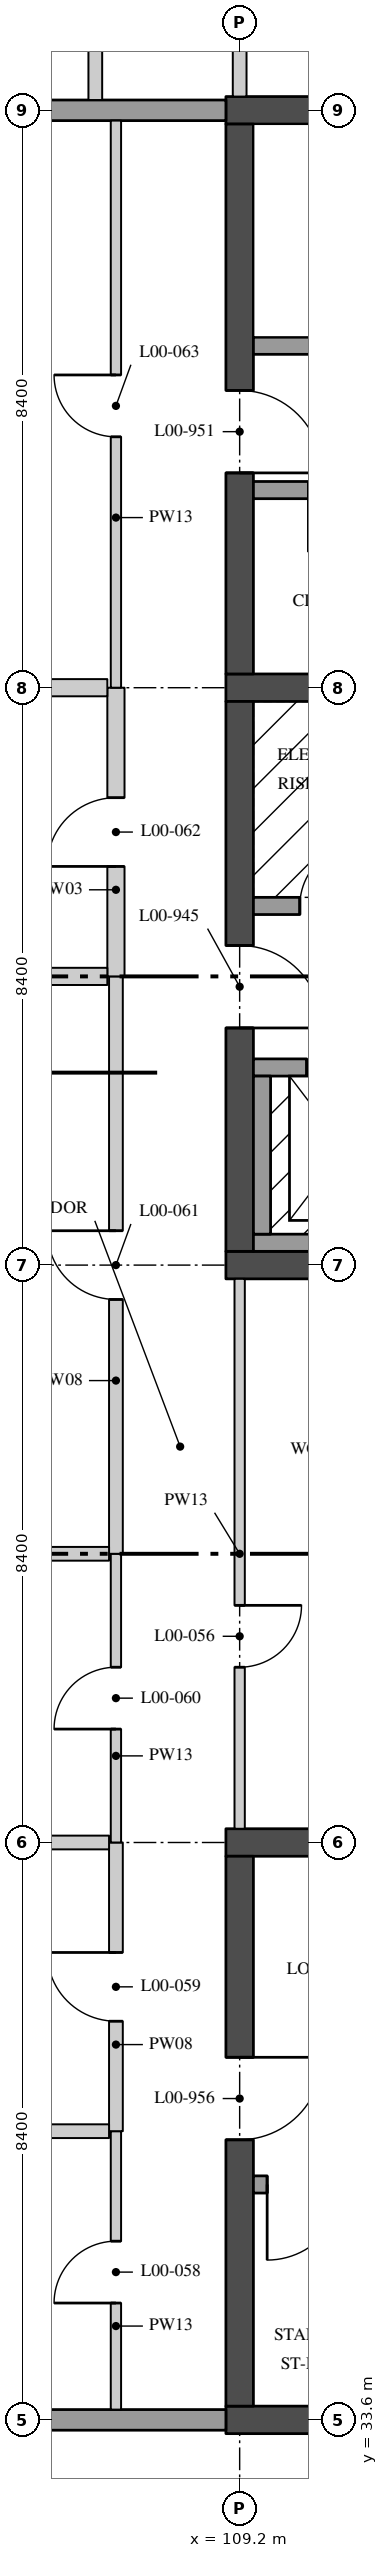
"""IFC4 building model, lengths in metres.
Left out: names, types, materials, properties, quantities, classifications, styles, units other than length and angle.
Written with IfcOpenShell. Run it as: python <this file> out.ifc"""

import sys

from ifc_helpers import new_model, si_unit, direction, frame, frame_2d, origin, place, context, subcontext, project, spatial, rectangle, extrude, element, fill, save


model = new_model("IFC4")
c1 = context("Model", 3, precision=1e-05, world=origin(), true_north=direction((0.0, 1.0)))
c2 = subcontext(c1, "Body", "Model", "MODEL_VIEW")
j1 = project(units=[si_unit("LENGTHUNIT", "METRE"), si_unit("PLANEANGLEUNIT", "RADIAN")], contexts=[c1])
p1 = place(None, origin())
s1 = spatial("IfcSite", under=j1, at=p1, CompositionType="ELEMENT")
p2 = place(p1, origin())
s2 = spatial("IfcBuilding", under=s1, at=p2, CompositionType="ELEMENT")
p3 = place(p2, origin())
s3 = spatial("IfcBuildingStorey", under=s2, at=p3, CompositionType="ELEMENT", Elevation=0.0)
p4 = place(p3, frame((109.0, 50.4, 0.0), z_axis=(0.0, 0.0, 1.0), x_axis=(1.0, 0.0, 0.0)))
e1 = element("IfcWall", 1, at=p4, inside=s3, PredefinedType="SHEAR", context=c2, shape_type="SweptSolid", body=[
    extrude(rectangle(XDim=8.8, YDim=0.4, at=frame_2d((4.4, 0.0))), origin(), (0.0, 0.0, 1.0), 5.05),
])
p5 = place(p3, frame((109.0, 58.8, 0.0), z_axis=(0.0, 0.0, 1.0), x_axis=(1.0, 0.0, 0.0)))
e2 = element("IfcWall", 2, at=p5, inside=s3, PredefinedType="SHEAR", context=c2, shape_type="SweptSolid", body=[
    extrude(rectangle(XDim=8.8, YDim=0.4, at=frame_2d((4.4, 0.0))), origin(), (0.0, 0.0, 1.0), 5.05),
])
p6 = place(p5, frame((6.65, 0.0, 0.0)))
e3 = element("IfcOpeningElement", 3, at=p6, cuts=e2, PredefinedType="OPENING", context=c2, shape_type="SweptSolid", body=[
    extrude(rectangle(XDim=1.1, YDim=2.1, at=frame_2d((0.55, 1.05))), frame((0.0, 0.21, 0.0), z_axis=(0.0, -1.0, 0.0), x_axis=(1.0, 0.0, 0.0)), (0.0, 0.0, 1.0), 0.42),
])
p7 = place(p3, frame((109.2, 50.6, 0.0), z_axis=(0.0, 0.0, 1.0), x_axis=(0.0, 1.0, 0.0)))
e4 = element("IfcWall", 4, at=p7, inside=s3, PredefinedType="SHEAR", context=c2, shape_type="SweptSolid", body=[
    extrude(rectangle(XDim=8.0, YDim=0.4, at=frame_2d((4.0, 0.0))), origin(), (0.0, 0.0, 1.0), 5.05),
])
p8 = place(p7, frame((3.25, 0.0, 0.0)))
e5 = element("IfcOpeningElement", 5, at=p8, cuts=e4, PredefinedType="OPENING", context=c2, shape_type="SweptSolid", body=[
    extrude(rectangle(XDim=1.2, YDim=2.1, at=frame_2d((0.6, 1.05))), frame((0.0, 0.21, 0.0), z_axis=(0.0, -1.0, 0.0), x_axis=(1.0, 0.0, 0.0)), (0.0, 0.0, 1.0), 0.42),
])
p9 = place(p3, frame((109.4, 55.625, 0.0), z_axis=(0.0, 0.0, 1.0), x_axis=(1.0, 0.0, 0.0)))
e6 = element("IfcWall", 6, at=p9, inside=s3, PredefinedType="SOLIDWALL", context=c2, shape_type="SweptSolid", body=[
    extrude(rectangle(XDim=2.25, YDim=0.25, at=frame_2d((1.125, 0.0))), origin(), (0.0, 0.0, 1.0), 5.05),
])
p10 = place(p9, frame((0.675, 0.0, 0.0)))
e7 = element("IfcOpeningElement", 7, at=p10, cuts=e6, PredefinedType="OPENING", context=c2, shape_type="SweptSolid", body=[
    extrude(rectangle(XDim=0.9, YDim=2.1, at=frame_2d((0.45, 1.05))), frame((0.0, 0.135, 0.0), z_axis=(0.0, -1.0, 0.0), x_axis=(1.0, 0.0, 0.0)), (0.0, 0.0, 1.0), 0.27),
])
p11 = place(p3, frame((109.0, 67.2, 0.0), z_axis=(0.0, 0.0, 1.0), x_axis=(1.0, 0.0, 0.0)))
e8 = element("IfcWall", 8, at=p11, inside=s3, PredefinedType="SHEAR", context=c2, shape_type="SweptSolid", body=[
    extrude(rectangle(XDim=8.8, YDim=0.4, at=frame_2d((4.4, 0.0))), origin(), (0.0, 0.0, 1.0), 5.05),
])
p12 = place(p3, frame((109.2, 59.0, 0.0), z_axis=(0.0, 0.0, 1.0), x_axis=(0.0, 1.0, 0.0)))
e9 = element("IfcWall", 9, at=p12, inside=s3, PredefinedType="SHEAR", context=c2, shape_type="SweptSolid", body=[
    extrude(rectangle(XDim=8.0, YDim=0.4, at=frame_2d((4.0, 0.0))), origin(), (0.0, 0.0, 1.0), 5.05),
])
p13 = place(p12, frame((2.925, 0.0, 0.0)))
e10 = element("IfcOpeningElement", 10, at=p13, cuts=e9, PredefinedType="OPENING", context=c2, shape_type="SweptSolid", body=[
    extrude(rectangle(XDim=1.2, YDim=2.1, at=frame_2d((0.6, 1.05))), frame((0.0, 0.21, 0.0), z_axis=(0.0, -1.0, 0.0), x_axis=(1.0, 0.0, 0.0)), (0.0, 0.0, 1.0), 0.42),
])
p14 = place(p3, frame((117.4, 63.775, 0.0), z_axis=(0.0, 0.0, 1.0), x_axis=(-1.0, 0.0, 0.0)))
e11 = element("IfcWall", 11, at=p14, inside=s3, PredefinedType="SOLIDWALL", context=c2, shape_type="SweptSolid", body=[
    extrude(rectangle(XDim=8.0, YDim=0.25, at=frame_2d((4.0, 0.0))), origin(), (0.0, 0.0, 1.0), 5.05),
])
p15 = place(p14, frame((0.2, 0.0, 0.0)))
e12 = element("IfcOpeningElement", 12, at=p15, cuts=e11, PredefinedType="OPENING", context=c2, shape_type="SweptSolid", body=[
    extrude(rectangle(XDim=1.1, YDim=2.1, at=frame_2d((0.55, 1.05))), frame((0.0, 0.135, 0.0), z_axis=(0.0, -1.0, 0.0), x_axis=(1.0, 0.0, 0.0)), (0.0, 0.0, 1.0), 0.27),
])
p16 = place(p3, frame((114.75, 61.675, 0.0), z_axis=(0.0, 0.0, 1.0), x_axis=(-1.0, 0.0, 0.0)))
e13 = element("IfcWall", 13, at=p16, inside=s3, PredefinedType="SOLIDWALL", context=c2, shape_type="SweptSolid", body=[
    extrude(rectangle(XDim=5.35, YDim=0.25, at=frame_2d((2.675, 0.0))), origin(), (0.0, 0.0, 1.0), 5.05),
])
p17 = place(p16, frame((3.65, 0.0, 0.0)))
e14 = element("IfcOpeningElement", 14, at=p17, cuts=e13, PredefinedType="OPENING", context=c2, shape_type="SweptSolid", body=[
    extrude(rectangle(XDim=0.9, YDim=2.1, at=frame_2d((0.45, 1.05))), frame((0.0, 0.135, 0.0), z_axis=(0.0, -1.0, 0.0), x_axis=(1.0, 0.0, 0.0)), (0.0, 0.0, 1.0), 0.27),
])
p18 = place(p16, frame((0.9, 0.0, 0.0)))
e15 = element("IfcOpeningElement", 15, at=p18, cuts=e13, PredefinedType="OPENING", context=c2, shape_type="SweptSolid", body=[
    extrude(rectangle(XDim=0.8, YDim=2.1, at=frame_2d((0.4, 1.05))), frame((0.0, 0.135, 0.0), z_axis=(0.0, -1.0, 0.0), x_axis=(1.0, 0.0, 0.0)), (0.0, 0.0, 1.0), 0.27),
])
for number, where, z_axis, x_axis in (
    (16, (109.0, 33.6, 0.0), (0.0, 0.0, 1.0), (1.0, 0.0, 0.0)),
    (17, (109.0, 42.0, 0.0), (0.0, 0.0, 1.0), (1.0, 0.0, 0.0)),
):
    element("IfcWall", number, at=place(p3, frame(where, z_axis=z_axis, x_axis=x_axis)), inside=s3, PredefinedType="SHEAR", context=c2, shape_type="SweptSolid", body=[
        extrude(rectangle(XDim=8.8, YDim=0.4, at=frame_2d((4.4, 0.0))), origin(), (0.0, 0.0, 1.0), 5.05),
    ])
p19 = place(p3, frame((109.2, 33.8, 0.0), z_axis=(0.0, 0.0, 1.0), x_axis=(0.0, 1.0, 0.0)))
e18 = element("IfcWall", 18, at=p19, inside=s3, PredefinedType="SHEAR", context=c2, shape_type="SweptSolid", body=[
    extrude(rectangle(XDim=8.0, YDim=0.4, at=frame_2d((4.0, 0.0))), origin(), (0.0, 0.0, 1.0), 5.05),
])
p20 = place(p19, frame((3.875, 0.0, 0.0)))
e19 = element("IfcOpeningElement", 19, at=p20, cuts=e18, PredefinedType="OPENING", context=c2, shape_type="SweptSolid", body=[
    extrude(rectangle(XDim=1.2, YDim=2.1, at=frame_2d((0.6, 1.05))), frame((0.0, 0.21, 0.0), z_axis=(0.0, -1.0, 0.0), x_axis=(1.0, 0.0, 0.0)), (0.0, 0.0, 1.0), 0.42),
])
p21 = place(p3, frame((109.4, 37.025, 0.0), z_axis=(0.0, 0.0, 1.0), x_axis=(1.0, 0.0, 0.0)))
e20 = element("IfcWall", 20, at=p21, inside=s3, PredefinedType="SOLIDWALL", context=c2, shape_type="SweptSolid", body=[
    extrude(rectangle(XDim=8.0, YDim=0.25, at=frame_2d((4.0, 0.0))), origin(), (0.0, 0.0, 1.0), 5.05),
])
p22 = place(p21, frame((0.2, 0.0, 0.0)))
e21 = element("IfcOpeningElement", 21, at=p22, cuts=e20, PredefinedType="OPENING", context=c2, shape_type="SweptSolid", body=[
    extrude(rectangle(XDim=1.1, YDim=2.1, at=frame_2d((0.55, 1.05))), frame((0.0, 0.135, 0.0), z_axis=(0.0, -1.0, 0.0), x_axis=(1.0, 0.0, 0.0)), (0.0, 0.0, 1.0), 0.27),
])
p23 = place(p3, frame((109.4, 53.275, 0.0), z_axis=(0.0, 0.0, 1.0), x_axis=(1.0, 0.0, 0.0)))
e22 = element("IfcWall", 22, at=p23, inside=s3, PredefinedType="SOLIDWALL", context=c2, shape_type="SweptSolid", body=[
    extrude(rectangle(XDim=2.65, YDim=0.25, at=frame_2d((1.325, 0.0))), origin(), (0.0, 0.0, 1.0), 5.05),
])
p24 = place(p23, frame((0.775, 0.0, 0.0)))
e23 = element("IfcOpeningElement", 23, at=p24, cuts=e22, PredefinedType="OPENING", context=c2, shape_type="SweptSolid", body=[
    extrude(rectangle(XDim=1.1, YDim=2.1, at=frame_2d((0.55, 1.05))), frame((0.0, 0.135, 0.0), z_axis=(0.0, -1.0, 0.0), x_axis=(1.0, 0.0, 0.0)), (0.0, 0.0, 1.0), 0.27),
])
p25 = place(p3, frame((109.4, 50.725, 0.0), z_axis=(0.0, 0.0, 1.0), x_axis=(1.0, 0.0, 0.0)))
e24 = element("IfcWall", 24, at=p25, inside=s3, PredefinedType="SOLIDWALL", context=c2, shape_type="SweptSolid", body=[
    extrude(rectangle(XDim=2.65, YDim=0.25, at=frame_2d((1.325, 0.0))), origin(), (0.0, 0.0, 1.0), 5.05),
])
p26 = place(p3, frame((109.525, 50.85, 0.0), z_axis=(0.0, 0.0, 1.0), x_axis=(0.0, 1.0, 0.0)))
e25 = element("IfcWall", 25, at=p26, inside=s3, PredefinedType="SOLIDWALL", context=c2, shape_type="SweptSolid", body=[
    extrude(rectangle(XDim=2.3, YDim=0.25, at=frame_2d((1.15, 0.0))), origin(), (0.0, 0.0, 1.0), 5.05),
])
p27 = place(p3, frame((109.2, 42.2, 0.0), z_axis=(0.0, 0.0, 1.0), x_axis=(0.0, 1.0, 0.0)))
e26 = element("IfcWall", 26, at=p27, inside=s3, PredefinedType="PARTITIONING", context=c2, shape_type="SweptSolid", body=[
    extrude(rectangle(XDim=8.0, YDim=0.15, at=frame_2d((4.0, 0.0))), origin(), (0.0, 0.0, 1.0), 5.05),
])
p28 = place(p27, frame((2.35, 0.0, 0.0)))
e27 = element("IfcOpeningElement", 27, at=p28, cuts=e26, PredefinedType="OPENING", context=c2, shape_type="SweptSolid", body=[
    extrude(rectangle(XDim=0.9, YDim=2.1, at=frame_2d((0.45, 1.05))), frame((0.0, 0.085, 0.0), z_axis=(0.0, -1.0, 0.0), x_axis=(1.0, 0.0, 0.0)), (0.0, 0.0, 1.0), 0.17),
])
p29 = place(p3, frame((107.4, 33.75, 0.0), z_axis=(0.0, 0.0, 1.0), x_axis=(0.0, 1.0, 0.0)))
e28 = element("IfcWall", 28, at=p29, inside=s3, PredefinedType="PARTITIONING", context=c2, shape_type="SweptSolid", body=[
    extrude(rectangle(XDim=4.05, YDim=0.15, at=frame_2d((2.025, 0.0))), origin(), (0.0, 0.0, 1.0), 5.05),
])
p30 = place(p29, frame((1.55, 0.0, 0.0)))
e29 = element("IfcOpeningElement", 29, at=p30, cuts=e28, PredefinedType="OPENING", context=c2, shape_type="SweptSolid", body=[
    extrude(rectangle(XDim=0.9, YDim=2.1, at=frame_2d((0.45, 1.05))), frame((0.0, 0.085, 0.0), z_axis=(0.0, -1.0, 0.0), x_axis=(1.0, 0.0, 0.0)), (0.0, 0.0, 1.0), 0.17),
])
p31 = place(p3, frame((107.4, 37.8, 0.0), z_axis=(0.0, 0.0, 1.0), x_axis=(0.0, 1.0, 0.0)))
e30 = element("IfcWall", 30, at=p31, inside=s3, PredefinedType="PARTITIONING", context=c2, shape_type="SweptSolid", body=[
    extrude(rectangle(XDim=4.2, YDim=0.2, at=frame_2d((2.1, 0.0))), origin(), (0.0, 0.0, 1.0), 5.05),
])
p32 = place(p31, frame((1.6, 0.0, 0.0)))
e31 = element("IfcOpeningElement", 31, at=p32, cuts=e30, PredefinedType="OPENING", context=c2, shape_type="SweptSolid", body=[
    extrude(rectangle(XDim=1.0, YDim=2.4, at=frame_2d((0.5, 1.2))), frame((0.0, 0.11, 0.0), z_axis=(0.0, -1.0, 0.0), x_axis=(1.0, 0.0, 0.0)), (0.0, 0.0, 1.0), 0.22),
])
p33 = place(p3, frame((107.4, 42.0, 0.0), z_axis=(0.0, 0.0, 1.0), x_axis=(0.0, 1.0, 0.0)))
e32 = element("IfcWall", 32, at=p33, inside=s3, PredefinedType="PARTITIONING", context=c2, shape_type="SweptSolid", body=[
    extrude(rectangle(XDim=4.2, YDim=0.15, at=frame_2d((2.1, 0.0))), origin(), (0.0, 0.0, 1.0), 5.05),
])
p34 = place(p33, frame((1.65, 0.0, 0.0)))
e33 = element("IfcOpeningElement", 33, at=p34, cuts=e32, PredefinedType="OPENING", context=c2, shape_type="SweptSolid", body=[
    extrude(rectangle(XDim=0.9, YDim=2.1, at=frame_2d((0.45, 1.05))), frame((0.0, 0.085, 0.0), z_axis=(0.0, -1.0, 0.0), x_axis=(1.0, 0.0, 0.0)), (0.0, 0.0, 1.0), 0.17),
])
p35 = place(p3, frame((107.4, 46.2, 0.0), z_axis=(0.0, 0.0, 1.0), x_axis=(0.0, 1.0, 0.0)))
e34 = element("IfcWall", 34, at=p35, inside=s3, PredefinedType="PARTITIONING", context=c2, shape_type="SweptSolid", body=[
    extrude(rectangle(XDim=8.4, YDim=0.2, at=frame_2d((4.2, 0.0))), origin(), (0.0, 0.0, 1.0), 5.05),
])
p36 = place(p35, frame((3.7, 0.0, 0.0)))
e35 = element("IfcOpeningElement", 35, at=p36, cuts=e34, PredefinedType="OPENING", context=c2, shape_type="SweptSolid", body=[
    extrude(rectangle(XDim=1.0, YDim=2.4, at=frame_2d((0.5, 1.2))), frame((0.0, 0.11, 0.0), z_axis=(0.0, -1.0, 0.0), x_axis=(1.0, 0.0, 0.0)), (0.0, 0.0, 1.0), 0.22),
])
p37 = place(p3, frame((107.4, 54.6, 0.0), z_axis=(0.0, 0.0, 1.0), x_axis=(0.0, 1.0, 0.0)))
e36 = element("IfcWall", 36, at=p37, inside=s3, PredefinedType="PARTITIONING", context=c2, shape_type="SweptSolid", body=[
    extrude(rectangle(XDim=4.2, YDim=0.25, at=frame_2d((2.1, 0.0))), origin(), (0.0, 0.0, 1.0), 5.05),
])
p38 = place(p37, frame((1.6, 0.0, 0.0)))
e37 = element("IfcOpeningElement", 37, at=p38, cuts=e36, PredefinedType="OPENING", context=c2, shape_type="SweptSolid", body=[
    extrude(rectangle(XDim=1.0, YDim=2.1, at=frame_2d((0.5, 1.05))), frame((0.0, 0.135, 0.0), z_axis=(0.0, -1.0, 0.0), x_axis=(1.0, 0.0, 0.0)), (0.0, 0.0, 1.0), 0.27),
])
p39 = place(p3, frame((107.4, 58.8, 0.0), z_axis=(0.0, 0.0, 1.0), x_axis=(0.0, 1.0, 0.0)))
e38 = element("IfcWall", 38, at=p39, inside=s3, PredefinedType="PARTITIONING", context=c2, shape_type="SweptSolid", body=[
    extrude(rectangle(XDim=8.25, YDim=0.15, at=frame_2d((4.125, 0.0))), origin(), (0.0, 0.0, 1.0), 5.05),
])
p40 = place(p39, frame((3.65, 0.0, 0.0)))
e39 = element("IfcOpeningElement", 39, at=p40, cuts=e38, PredefinedType="OPENING", context=c2, shape_type="SweptSolid", body=[
    extrude(rectangle(XDim=0.9, YDim=2.1, at=frame_2d((0.45, 1.05))), frame((0.0, 0.085, 0.0), z_axis=(0.0, -1.0, 0.0), x_axis=(1.0, 0.0, 0.0)), (0.0, 0.0, 1.0), 0.17),
])
p41 = place(p3, frame((100.95, 37.8, 0.0), z_axis=(0.0, 0.0, 1.0), x_axis=(1.0, 0.0, 0.0)))
e40 = element("IfcWall", 40, at=p41, inside=s3, PredefinedType="PARTITIONING", context=c2, shape_type="SweptSolid", body=[
    extrude(rectangle(XDim=6.35, YDim=0.2, at=frame_2d((3.175, 0.0))), origin(), (0.0, 0.0, 1.0), 5.05),
])
p42 = place(p3, frame((101.25, 42.0, 0.0), z_axis=(0.0, 0.0, 1.0), x_axis=(1.0, 0.0, 0.0)))
e41 = element("IfcWall", 41, at=p42, inside=s3, PredefinedType="PARTITIONING", context=c2, shape_type="SweptSolid", body=[
    extrude(rectangle(XDim=6.05, YDim=0.2, at=frame_2d((3.025, 0.0))), origin(), (0.0, 0.0, 1.0), 5.05),
])
p43 = place(p3, frame((100.95, 46.2, 0.0), z_axis=(0.0, 0.0, 1.0), x_axis=(1.0, 0.0, 0.0)))
e42 = element("IfcWall", 42, at=p43, inside=s3, PredefinedType="PARTITIONING", context=c2, shape_type="SweptSolid", body=[
    extrude(rectangle(XDim=6.35, YDim=0.2, at=frame_2d((3.175, 0.0))), origin(), (0.0, 0.0, 1.0), 5.05),
])
p44 = place(p3, frame((100.95, 54.6, 0.0), z_axis=(0.0, 0.0, 1.0), x_axis=(1.0, 0.0, 0.0)))
e43 = element("IfcWall", 43, at=p44, inside=s3, PredefinedType="PARTITIONING", context=c2, shape_type="SweptSolid", body=[
    extrude(rectangle(XDim=6.325, YDim=0.25, at=frame_2d((3.163, 0.0))), origin(), (0.0, 0.0, 1.0), 5.05),
])
p45 = place(p3, frame((101.25, 58.8, 0.0), z_axis=(0.0, 0.0, 1.0), x_axis=(1.0, 0.0, 0.0)))
e44 = element("IfcWall", 44, at=p45, inside=s3, PredefinedType="PARTITIONING", context=c2, shape_type="SweptSolid", body=[
    extrude(rectangle(XDim=6.025, YDim=0.25, at=frame_2d((3.012, 0.0))), origin(), (0.0, 0.0, 1.0), 5.05),
])
p46 = place(p3, frame((107.1, 67.35, 0.0), z_axis=(0.0, 0.0, 1.0), x_axis=(0.0, 1.0, 0.0)))
e45 = element("IfcWall", 45, at=p46, inside=s3, PredefinedType="PARTITIONING", context=c2, shape_type="SweptSolid", body=[
    extrude(rectangle(XDim=3.05, YDim=0.2, at=frame_2d((1.525, 0.0))), origin(), (0.0, 0.0, 1.0), 5.05),
])
p47 = place(p3, frame((109.2, 67.4, 0.0), z_axis=(0.0, 0.0, 1.0), x_axis=(0.0, 1.0, 0.0)))
e46 = element("IfcWall", 46, at=p47, inside=s3, PredefinedType="PARTITIONING", context=c2, shape_type="SweptSolid", body=[
    extrude(rectangle(XDim=3.0, YDim=0.2, at=frame_2d((1.5, 0.0))), origin(), (0.0, 0.0, 1.0), 5.05),
])
p48 = place(p3, frame((109.0, 33.6, 0.0), z_axis=(0.0, 0.0, 1.0), x_axis=(-1.0, 0.0, 0.0)))
e47 = element("IfcWall", 47, at=p48, inside=s3, PredefinedType="SOLIDWALL", context=c2, shape_type="SweptSolid", body=[
    extrude(rectangle(XDim=8.0, YDim=0.3, at=frame_2d((4.0, 0.0))), origin(), (0.0, 0.0, 1.0), 5.05),
])
p49 = place(p3, frame((109.0, 67.2, 0.0), z_axis=(0.0, 0.0, 1.0), x_axis=(-1.0, 0.0, 0.0)))
e48 = element("IfcWall", 48, at=p49, inside=s3, PredefinedType="SOLIDWALL", context=c2, shape_type="SweptSolid", body=[
    extrude(rectangle(XDim=7.77, YDim=0.3, at=frame_2d((3.885, 0.0))), origin(), (0.0, 0.0, 1.0), 5.05),
])
p50 = place(p8, frame((1.2, 0.0, 0.0), z_axis=(0.0, 0.0, 1.0), x_axis=(-1.0, 0.0, 0.0)))
e49 = element("IfcDoor", 49, at=p50, inside=s3, OperationType="SINGLE_SWING_LEFT", PredefinedType="DOOR", context=c2, shape_type="SweptSolid", body=[
    extrude(rectangle(XDim=1.2, YDim=2.1, at=frame_2d((0.6, 1.05))), frame((0.0, 0.035, 0.0), z_axis=(0.0, -1.0, 0.0), x_axis=(1.0, 0.0, 0.0)), (0.0, 0.0, 1.0), 0.07),
])
fill(e5, e49)
p51 = place(p10, origin())
e50 = element("IfcDoor", 50, at=p51, inside=s3, OperationType="SINGLE_SWING_LEFT", PredefinedType="DOOR", context=c2, shape_type="SweptSolid", body=[
    extrude(rectangle(XDim=0.9, YDim=2.1, at=frame_2d((0.45, 1.05))), frame((0.0, 0.05, 0.0), z_axis=(0.0, -1.0, 0.0), x_axis=(1.0, 0.0, 0.0)), (0.0, 0.0, 1.0), 0.1),
])
fill(e7, e50)
p52 = place(p13, frame((1.2, 0.0, 0.0), z_axis=(0.0, 0.0, 1.0), x_axis=(-1.0, 0.0, 0.0)))
e51 = element("IfcDoor", 51, at=p52, inside=s3, OperationType="SINGLE_SWING_LEFT", PredefinedType="DOOR", context=c2, shape_type="SweptSolid", body=[
    extrude(rectangle(XDim=1.2, YDim=2.1, at=frame_2d((0.6, 1.05))), frame((0.0, 0.035, 0.0), z_axis=(0.0, -1.0, 0.0), x_axis=(1.0, 0.0, 0.0)), (0.0, 0.0, 1.0), 0.07),
])
fill(e10, e51)
p53 = place(p20, frame((1.2, 0.0, 0.0), z_axis=(0.0, 0.0, 1.0), x_axis=(-1.0, 0.0, 0.0)))
e52 = element("IfcDoor", 52, at=p53, inside=s3, OperationType="SINGLE_SWING_RIGHT", PredefinedType="DOOR", context=c2, shape_type="SweptSolid", body=[
    extrude(rectangle(XDim=1.2, YDim=2.1, at=frame_2d((0.6, 1.05))), frame((0.0, 0.035, 0.0), z_axis=(0.0, -1.0, 0.0), x_axis=(1.0, 0.0, 0.0)), (0.0, 0.0, 1.0), 0.07),
])
fill(e19, e52)
p54 = place(p22, frame((1.1, 0.0, 0.0), z_axis=(0.0, 0.0, 1.0), x_axis=(-1.0, 0.0, 0.0)))
e53 = element("IfcDoor", 53, at=p54, inside=s3, OperationType="SINGLE_SWING_LEFT", PredefinedType="DOOR", context=c2, shape_type="SweptSolid", body=[
    extrude(rectangle(XDim=1.1, YDim=2.1, at=frame_2d((0.55, 1.05))), frame((0.0, 0.035, 0.0), z_axis=(0.0, -1.0, 0.0), x_axis=(1.0, 0.0, 0.0)), (0.0, 0.0, 1.0), 0.07),
])
fill(e21, e53)
p55 = place(p24, origin())
e54 = element("IfcDoor", 54, at=p55, inside=s3, OperationType="DOUBLE_DOOR_SLIDING", PredefinedType="DOOR", context=c2, shape_type="SweptSolid", body=[
    extrude(rectangle(XDim=1.1, YDim=2.1, at=frame_2d((0.55, 1.05))), frame((0.0, 0.04, 0.0), z_axis=(0.0, -1.0, 0.0), x_axis=(1.0, 0.0, 0.0)), (0.0, 0.0, 1.0), 0.08),
])
fill(e23, e54)
p56 = place(p28, frame((0.9, 0.0, 0.0), z_axis=(0.0, 0.0, 1.0), x_axis=(-1.0, 0.0, 0.0)))
e55 = element("IfcDoor", 55, at=p56, inside=s3, OperationType="SINGLE_SWING_RIGHT", PredefinedType="DOOR", context=c2, shape_type="SweptSolid", body=[
    extrude(rectangle(XDim=0.9, YDim=2.1, at=frame_2d((0.45, 1.05))), frame((0.0, 0.025, 0.0), z_axis=(0.0, -1.0, 0.0), x_axis=(1.0, 0.0, 0.0)), (0.0, 0.0, 1.0), 0.05),
])
fill(e27, e55)
p57 = place(p30, origin())
e56 = element("IfcDoor", 56, at=p57, inside=s3, OperationType="SINGLE_SWING_RIGHT", PredefinedType="DOOR", context=c2, shape_type="SweptSolid", body=[
    extrude(rectangle(XDim=0.9, YDim=2.1, at=frame_2d((0.45, 1.05))), frame((0.0, 0.025, 0.0), z_axis=(0.0, -1.0, 0.0), x_axis=(1.0, 0.0, 0.0)), (0.0, 0.0, 1.0), 0.05),
])
fill(e29, e56)
p58 = place(p32, origin())
e57 = element("IfcDoor", 57, at=p58, inside=s3, OperationType="SINGLE_SWING_LEFT", PredefinedType="DOOR", context=c2, shape_type="SweptSolid", body=[
    extrude(rectangle(XDim=1.0, YDim=2.4, at=frame_2d((0.5, 1.2))), frame((0.0, 0.03, 0.0), z_axis=(0.0, -1.0, 0.0), x_axis=(1.0, 0.0, 0.0)), (0.0, 0.0, 1.0), 0.06),
])
fill(e31, e57)
p59 = place(p34, origin())
e58 = element("IfcDoor", 58, at=p59, inside=s3, OperationType="SINGLE_SWING_RIGHT", PredefinedType="DOOR", context=c2, shape_type="SweptSolid", body=[
    extrude(rectangle(XDim=0.9, YDim=2.1, at=frame_2d((0.45, 1.05))), frame((0.0, 0.025, 0.0), z_axis=(0.0, -1.0, 0.0), x_axis=(1.0, 0.0, 0.0)), (0.0, 0.0, 1.0), 0.05),
])
fill(e33, e58)
p60 = place(p36, origin())
e59 = element("IfcDoor", 59, at=p60, inside=s3, OperationType="SINGLE_SWING_LEFT", PredefinedType="DOOR", context=c2, shape_type="SweptSolid", body=[
    extrude(rectangle(XDim=1.0, YDim=2.4, at=frame_2d((0.5, 1.2))), frame((0.0, 0.03, 0.0), z_axis=(0.0, -1.0, 0.0), x_axis=(1.0, 0.0, 0.0)), (0.0, 0.0, 1.0), 0.06),
])
fill(e35, e59)
p61 = place(p38, origin())
e60 = element("IfcDoor", 60, at=p61, inside=s3, OperationType="SINGLE_SWING_RIGHT", PredefinedType="DOOR", context=c2, shape_type="SweptSolid", body=[
    extrude(rectangle(XDim=1.0, YDim=2.1, at=frame_2d((0.5, 1.05))), frame((0.0, 0.05, 0.0), z_axis=(0.0, -1.0, 0.0), x_axis=(1.0, 0.0, 0.0)), (0.0, 0.0, 1.0), 0.1),
])
fill(e37, e60)
p62 = place(p40, origin())
e61 = element("IfcDoor", 61, at=p62, inside=s3, OperationType="SINGLE_SWING_LEFT", PredefinedType="DOOR", context=c2, shape_type="SweptSolid", body=[
    extrude(rectangle(XDim=0.9, YDim=2.1, at=frame_2d((0.45, 1.05))), frame((0.0, 0.025, 0.0), z_axis=(0.0, -1.0, 0.0), x_axis=(1.0, 0.0, 0.0)), (0.0, 0.0, 1.0), 0.05),
])
fill(e39, e61)
save(model, sys.argv[1])
